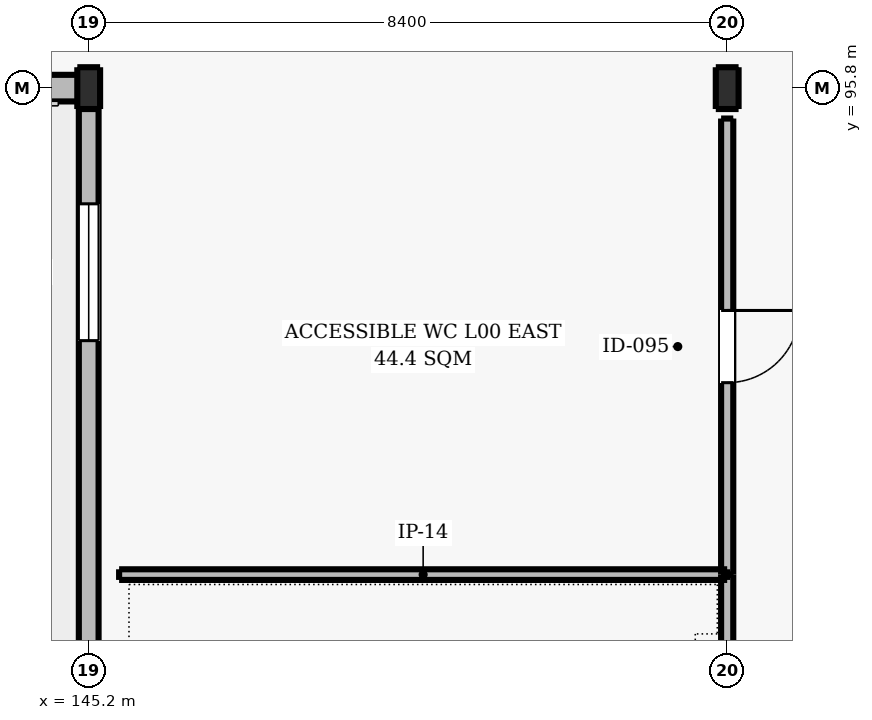
"""IFC4 building model, lengths in metres.
Left out: names, types, materials, properties, quantities, classifications, styles, units other than length and angle.
Written with IfcOpenShell. Run it as: python <this file> out.ifc"""

import sys

from ifc_helpers import new_model, si_unit, direction, frame, frame_2d, origin, origin_2d, place, context, subcontext, project, spatial, rectangle, i_section, extrude, element, fill, save


model = new_model("IFC4")
c1 = context("Model", 3, precision=1e-05, world=origin(), true_north=direction((0.0, 1.0)))
c2 = subcontext(c1, "Body", "Model", "MODEL_VIEW")
j1 = project(units=[si_unit("LENGTHUNIT", "METRE"), si_unit("PLANEANGLEUNIT", "RADIAN")], contexts=[c1])
p1 = place(None, origin())
s1 = spatial("IfcSite", under=j1, at=p1, CompositionType="ELEMENT")
p2 = place(p1, origin())
s2 = spatial("IfcBuilding", under=s1, at=p2, CompositionType="ELEMENT")
p3 = place(p2, origin())
s3 = spatial("IfcBuildingStorey", under=s2, at=p3, CompositionType="ELEMENT", Elevation=0.0)
for number, where, z_axis, x_axis in (
    (1, (145.2, 95.8, 0.0), (0.0, 0.0, 1.0), (1.0, 0.0, 0.0)),
    (2, (153.6, 95.8, 0.0), (0.0, 0.0, 1.0), (1.0, 0.0, 0.0)),
):
    element("IfcColumn", number, at=place(p3, frame(where, z_axis=z_axis, x_axis=x_axis)), inside=s3, PredefinedType="COLUMN", context=c2, shape_type="SweptSolid", body=[
        extrude(i_section(OverallWidth=0.3, OverallDepth=0.55, WebThickness=0.015, FlangeThickness=0.029, FilletRadius=0.027, at=origin_2d()), origin(), (0.0, 0.0, 1.0), 5.1),
    ])
p4 = place(p3, frame((145.2, 52.2, 0.0), z_axis=(0.0, 0.0, 1.0), x_axis=(0.0, 1.0, 0.0)))
e3 = element("IfcWall", 3, at=p4, inside=s3, PredefinedType="SOLIDWALL", context=c2, shape_type="SweptSolid", body=[
    extrude(rectangle(XDim=43.6, YDim=0.26, at=frame_2d((21.8, 0.0))), origin(), (0.0, 0.0, 1.0), 4.31),
])
p5 = place(p4, frame((1.522, 0.0, 1.05)))
e4 = element("IfcOpeningElement", 4, at=p5, cuts=e3, PredefinedType="OPENING", context=c2, shape_type="SweptSolid", body=[
    extrude(rectangle(XDim=1.8, YDim=1.65, at=frame_2d((0.9, 0.825))), frame((0.0, 0.14, 0.0), z_axis=(0.0, -1.0, 0.0), x_axis=(1.0, 0.0, 0.0)), (0.0, 0.0, 1.0), 0.28),
])
p6 = place(p4, frame((6.367, 0.0, 1.05)))
e5 = element("IfcOpeningElement", 5, at=p6, cuts=e3, PredefinedType="OPENING", context=c2, shape_type="SweptSolid", body=[
    extrude(rectangle(XDim=1.8, YDim=1.65, at=frame_2d((0.9, 0.825))), frame((0.0, 0.14, 0.0), z_axis=(0.0, -1.0, 0.0), x_axis=(1.0, 0.0, 0.0)), (0.0, 0.0, 1.0), 0.28),
])
p7 = place(p4, frame((16.056, 0.0, 1.05)))
e6 = element("IfcOpeningElement", 6, at=p7, cuts=e3, PredefinedType="OPENING", context=c2, shape_type="SweptSolid", body=[
    extrude(rectangle(XDim=1.8, YDim=1.65, at=frame_2d((0.9, 0.825))), frame((0.0, 0.14, 0.0), z_axis=(0.0, -1.0, 0.0), x_axis=(1.0, 0.0, 0.0)), (0.0, 0.0, 1.0), 0.28),
])
p8 = place(p4, frame((20.9, 0.0, 1.05)))
e7 = element("IfcOpeningElement", 7, at=p8, cuts=e3, PredefinedType="OPENING", context=c2, shape_type="SweptSolid", body=[
    extrude(rectangle(XDim=1.8, YDim=1.65, at=frame_2d((0.9, 0.825))), frame((0.0, 0.14, 0.0), z_axis=(0.0, -1.0, 0.0), x_axis=(1.0, 0.0, 0.0)), (0.0, 0.0, 1.0), 0.28),
])
p9 = place(p4, frame((25.744, 0.0, 1.05)))
e8 = element("IfcOpeningElement", 8, at=p9, cuts=e3, PredefinedType="OPENING", context=c2, shape_type="SweptSolid", body=[
    extrude(rectangle(XDim=1.8, YDim=1.65, at=frame_2d((0.9, 0.825))), frame((0.0, 0.14, 0.0), z_axis=(0.0, -1.0, 0.0), x_axis=(1.0, 0.0, 0.0)), (0.0, 0.0, 1.0), 0.28),
])
p10 = place(p4, frame((30.589, 0.0, 1.05)))
e9 = element("IfcOpeningElement", 9, at=p10, cuts=e3, PredefinedType="OPENING", context=c2, shape_type="SweptSolid", body=[
    extrude(rectangle(XDim=1.8, YDim=1.65, at=frame_2d((0.9, 0.825))), frame((0.0, 0.14, 0.0), z_axis=(0.0, -1.0, 0.0), x_axis=(1.0, 0.0, 0.0)), (0.0, 0.0, 1.0), 0.28),
])
p11 = place(p4, frame((40.278, 0.0, 1.05)))
e10 = element("IfcOpeningElement", 10, at=p11, cuts=e3, PredefinedType="OPENING", context=c2, shape_type="SweptSolid", body=[
    extrude(rectangle(XDim=1.8, YDim=1.65, at=frame_2d((0.9, 0.825))), frame((0.0, 0.14, 0.0), z_axis=(0.0, -1.0, 0.0), x_axis=(1.0, 0.0, 0.0)), (0.0, 0.0, 1.0), 0.28),
])
p12 = place(p3, frame((145.2, 95.8, 0.0), z_axis=(0.0, 0.0, 1.0), x_axis=(-1.0, 0.0, 0.0)))
e11 = element("IfcWall", 11, at=p12, inside=s3, PredefinedType="SOLIDWALL", context=c2, shape_type="SweptSolid", body=[
    extrude(rectangle(XDim=34.2, YDim=0.35, at=frame_2d((17.1, 0.0))), origin(), (0.0, 0.0, 1.0), 4.26),
])
p13 = place(p12, frame((1.468, 0.0, 1.05)))
e12 = element("IfcOpeningElement", 12, at=p13, cuts=e11, PredefinedType="OPENING", context=c2, shape_type="SweptSolid", body=[
    extrude(rectangle(XDim=1.95, YDim=1.65, at=frame_2d((0.975, 0.825))), frame((0.0, 0.185, 0.0), z_axis=(0.0, -1.0, 0.0), x_axis=(1.0, 0.0, 0.0)), (0.0, 0.0, 1.0), 0.37),
])
p14 = place(p12, frame((11.239, 0.0, 1.05)))
e13 = element("IfcOpeningElement", 13, at=p14, cuts=e11, PredefinedType="OPENING", context=c2, shape_type="SweptSolid", body=[
    extrude(rectangle(XDim=1.95, YDim=1.65, at=frame_2d((0.975, 0.825))), frame((0.0, 0.185, 0.0), z_axis=(0.0, -1.0, 0.0), x_axis=(1.0, 0.0, 0.0)), (0.0, 0.0, 1.0), 0.37),
])
p15 = place(p12, frame((21.011, 0.0, 1.05)))
e14 = element("IfcOpeningElement", 14, at=p15, cuts=e11, PredefinedType="OPENING", context=c2, shape_type="SweptSolid", body=[
    extrude(rectangle(XDim=1.95, YDim=1.65, at=frame_2d((0.975, 0.825))), frame((0.0, 0.185, 0.0), z_axis=(0.0, -1.0, 0.0), x_axis=(1.0, 0.0, 0.0)), (0.0, 0.0, 1.0), 0.37),
])
p16 = place(p12, frame((25.896, 0.0, 1.05)))
e15 = element("IfcOpeningElement", 15, at=p16, cuts=e11, PredefinedType="OPENING", context=c2, shape_type="SweptSolid", body=[
    extrude(rectangle(XDim=1.95, YDim=1.65, at=frame_2d((0.975, 0.825))), frame((0.0, 0.185, 0.0), z_axis=(0.0, -1.0, 0.0), x_axis=(1.0, 0.0, 0.0)), (0.0, 0.0, 1.0), 0.37),
])
p17 = place(p12, frame((30.782, 0.0, 1.05)))
e16 = element("IfcOpeningElement", 16, at=p17, cuts=e11, PredefinedType="OPENING", context=c2, shape_type="SweptSolid", body=[
    extrude(rectangle(XDim=1.95, YDim=1.65, at=frame_2d((0.975, 0.825))), frame((0.0, 0.185, 0.0), z_axis=(0.0, -1.0, 0.0), x_axis=(1.0, 0.0, 0.0)), (0.0, 0.0, 1.0), 0.37),
])
p18 = place(p3, frame((153.6, 76.4, 0.0), z_axis=(0.0, 0.0, 1.0), x_axis=(0.0, 1.0, 0.0)))
e17 = element("IfcWall", 17, at=p18, inside=s3, PredefinedType="PARTITIONING", context=c2, shape_type="SweptSolid", body=[
    extrude(rectangle(XDim=13.0, YDim=0.16, at=frame_2d((6.5, 0.0))), origin(), (0.0, 0.0, 1.0), 4.31),
])
p19 = place(p18, frame((5.9, 0.0, 0.0)))
e18 = element("IfcOpeningElement", 18, at=p19, cuts=e17, PredefinedType="OPENING", context=c2, shape_type="SweptSolid", body=[
    extrude(rectangle(XDim=1.2, YDim=2.2, at=frame_2d((0.6, 1.1))), frame((0.0, 0.09, 0.0), z_axis=(0.0, -1.0, 0.0), x_axis=(1.0, 0.0, 0.0)), (0.0, 0.0, 1.0), 0.18),
])
p20 = place(p3, frame((145.6, 89.4, 0.0), z_axis=(0.0, 0.0, 1.0), x_axis=(1.0, 0.0, 0.0)))
e19 = element("IfcWall", 19, at=p20, inside=s3, PredefinedType="PARTITIONING", context=c2, shape_type="SweptSolid", body=[
    extrude(rectangle(XDim=8.0, YDim=0.14, at=frame_2d((4.0, 0.0))), origin(), (0.0, 0.0, 1.0), 4.82),
])
p21 = place(p3, frame((153.6, 89.4, 0.0), z_axis=(0.0, 0.0, 1.0), x_axis=(0.0, 1.0, 0.0)))
e20 = element("IfcWall", 20, at=p21, inside=s3, PredefinedType="PARTITIONING", context=c2, shape_type="SweptSolid", body=[
    extrude(rectangle(XDim=6.0, YDim=0.16, at=frame_2d((3.0, 0.0))), origin(), (0.0, 0.0, 1.0), 4.36),
])
p22 = place(p21, frame((2.525, 0.0, 0.0)))
e21 = element("IfcOpeningElement", 21, at=p22, cuts=e20, PredefinedType="OPENING", context=c2, shape_type="SweptSolid", body=[
    extrude(rectangle(XDim=0.95, YDim=2.1, at=frame_2d((0.475, 1.05))), frame((0.0, 0.09, 0.0), z_axis=(0.0, -1.0, 0.0), x_axis=(1.0, 0.0, 0.0)), (0.0, 0.0, 1.0), 0.18),
])
p23 = place(p11, origin())
e22 = element("IfcWindow", 22, at=p23, inside=s3, PartitioningType="SINGLE_PANEL", PredefinedType="WINDOW", context=c2, shape_type="SweptSolid", body=[
    extrude(rectangle(XDim=1.8, YDim=1.65, at=frame_2d((0.9, 0.825))), frame((0.0, 0.03, 0.0), z_axis=(0.0, -1.0, 0.0), x_axis=(1.0, 0.0, 0.0)), (0.0, 0.0, 1.0), 0.06),
])
fill(e10, e22)
p24 = place(p22, frame((0.95, 0.0, 0.0), z_axis=(0.0, 0.0, 1.0), x_axis=(-1.0, 0.0, 0.0)))
e23 = element("IfcDoor", 23, at=p24, inside=s3, OperationType="SINGLE_SWING_RIGHT", PredefinedType="DOOR", context=c2, shape_type="SweptSolid", body=[
    extrude(rectangle(XDim=0.95, YDim=2.1, at=frame_2d((0.475, 1.05))), frame((0.0, 0.025, 0.0), z_axis=(0.0, -1.0, 0.0), x_axis=(1.0, 0.0, 0.0)), (0.0, 0.0, 1.0), 0.05),
])
fill(e21, e23)
save(model, sys.argv[1])
